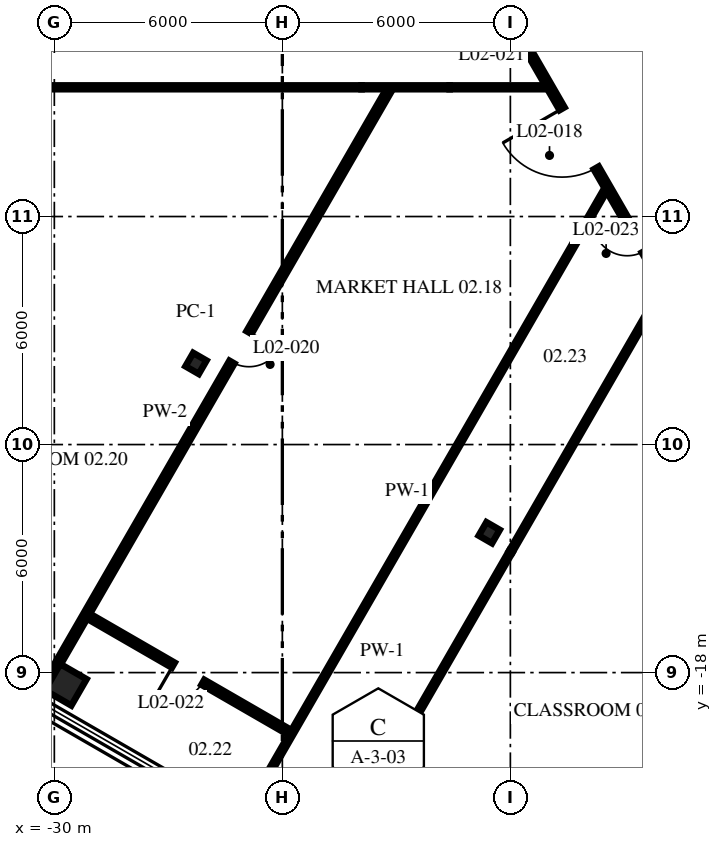
"""IFC4 building model, lengths in metres.
Left out: names, types, materials, properties, quantities, classifications, styles, units other than length and angle.
Written with IfcOpenShell. Run it as: python <this file> out.ifc"""

import sys

from ifc_helpers import new_model, si_unit, direction, frame, frame_2d, origin, origin_2d, place, context, subcontext, project, spatial, rectangle, i_section, extrude, source, transform, mapped, element, fill, save


model = new_model("IFC4")
c1 = context("Model", 3, precision=1e-05, world=origin(), true_north=direction((0.0, 1.0)))
c2 = subcontext(c1, "Body", "Model", "MODEL_VIEW")
j1 = project(units=[si_unit("LENGTHUNIT", "METRE"), si_unit("PLANEANGLEUNIT", "RADIAN")], contexts=[c1])
p1 = place(None, origin())
s1 = spatial("IfcSite", under=j1, at=p1, CompositionType="ELEMENT")
p2 = place(p1, origin())
s2 = spatial("IfcBuilding", under=s1, at=p2, CompositionType="ELEMENT")
p3 = place(p2, frame((0.0, 0.0, 11.5)))
s3 = spatial("IfcBuildingStorey", under=s2, at=p3, CompositionType="ELEMENT", Elevation=11.5)
m1 = source(origin(), c2, "Body", "SweptSolid", [
    extrude(i_section(OverallWidth=0.404, OverallDepth=0.406, WebThickness=0.027, FlangeThickness=0.044, at=origin_2d()), origin(), (0.0, 0.0, 1.0), 4.5),
])
for number, where, z_axis, x_axis in (
    (1, (-26.272, -9.865, 0.0), (0.0, 0.0, 1.0), (0.866, -0.5, 0.0)),
    (2, (-18.556, -14.32, 0.0), (0.0, 0.0, 1.0), (0.866, -0.5, 0.0)),
):
    element("IfcColumn", number, at=place(p3, frame(where, z_axis=z_axis, x_axis=x_axis)), inside=s3, PredefinedType="COLUMN", context=c2, shape_type="MappedRepresentation", body=[
        mapped(m1, transform((0.0, 0.0, 0.0), scale=1.0)),
    ])
m2 = source(origin(), c2, "Body", "SweptSolid", [
    extrude(rectangle(XDim=0.8, YDim=0.8, at=origin_2d()), origin(), (0.0, 0.0, 1.0), 4.5),
])
p4 = place(p3, frame((-29.699, -18.32, 0.0), z_axis=(0.0, 0.0, 1.0), x_axis=(0.866025403784, -0.5, 0.0)))
e3 = element("IfcColumn", 3, at=p4, inside=s3, PredefinedType="COLUMN", context=c2, shape_type="MappedRepresentation", body=[
    mapped(m2, transform((0.0, 0.0, 0.0), scale=1.0)),
])
p5 = place(p3, frame((-18.441, -0.043, 0.0), z_axis=(0.0, 0.0, 1.0), x_axis=(0.499994421829, -0.866028624319, 0.0)))
e4 = element("IfcWall", 4, at=p5, inside=s3, PredefinedType="PARTITIONING", context=c2, shape_type="SweptSolid", body=[
    extrude(rectangle(XDim=18.416, YDim=0.15, at=frame_2d((9.208, 0.0))), origin(), (0.0, 0.0, 1.0), 4.3),
])
p6 = place(p5, frame((3.602, 0.0, 0.0)))
e5 = element("IfcOpeningElement", 5, at=p6, cuts=e4, PredefinedType="OPENING", context=c2, shape_type="SweptSolid", body=[
    extrude(rectangle(XDim=1.8, YDim=2.4, at=frame_2d((0.9, 1.2))), frame((0.0, 0.085, 0.0), z_axis=(0.0, -1.0, 0.0), x_axis=(1.0, 0.0, 0.0)), (0.0, 0.0, 1.0), 0.17),
])
p7 = place(p5, frame((1.0, 0.0, 0.0)))
e6 = element("IfcOpeningElement", 6, at=p7, cuts=e4, PredefinedType="OPENING", context=c2, shape_type="SweptSolid", body=[
    extrude(rectangle(XDim=0.9, YDim=2.1, at=frame_2d((0.45, 1.05))), frame((0.0, 0.085, 0.0), z_axis=(0.0, -1.0, 0.0), x_axis=(1.0, 0.0, 0.0)), (0.0, 0.0, 1.0), 0.17),
])
p8 = place(p5, frame((7.031, 0.0, 0.0)))
e7 = element("IfcOpeningElement", 7, at=p8, cuts=e4, PredefinedType="OPENING", context=c2, shape_type="SweptSolid", body=[
    extrude(rectangle(XDim=0.9, YDim=2.1, at=frame_2d((0.45, 1.05))), frame((0.0, 0.085, 0.0), z_axis=(0.0, -1.0, 0.0), x_axis=(1.0, 0.0, 0.0)), (0.0, 0.0, 1.0), 0.17),
])
p9 = place(p5, frame((13.233, 0.0, 0.0)))
e8 = element("IfcOpeningElement", 8, at=p9, cuts=e4, PredefinedType="OPENING", context=c2, shape_type="SweptSolid", body=[
    extrude(rectangle(XDim=0.9, YDim=2.1, at=frame_2d((0.45, 1.05))), frame((0.0, 0.085, 0.0), z_axis=(0.0, -1.0, 0.0), x_axis=(1.0, 0.0, 0.0)), (0.0, 0.0, 1.0), 0.17),
])
p10 = place(p3, frame((-29.122, -16.504, 0.0), z_axis=(0.0, 0.0, 1.0), x_axis=(0.866022773512, -0.500004555738, 0.0)))
e9 = element("IfcWall", 9, at=p10, inside=s3, PredefinedType="PARTITIONING", context=c2, shape_type="SweptSolid", body=[
    extrude(rectangle(XDim=6.168, YDim=0.15, at=frame_2d((3.084, 0.0))), origin(), (0.0, 0.0, 1.0), 4.3),
])
p11 = place(p10, frame((2.6, 0.0, 0.0)))
e10 = element("IfcOpeningElement", 10, at=p11, cuts=e9, PredefinedType="OPENING", context=c2, shape_type="SweptSolid", body=[
    extrude(rectangle(XDim=0.9, YDim=2.1, at=frame_2d((0.45, 1.05))), frame((0.0, 0.085, 0.0), z_axis=(0.0, -1.0, 0.0), x_axis=(1.0, 0.0, 0.0)), (0.0, 0.0, 1.0), 0.17),
])
p12 = place(p3, frame((-39.237, -2.6, 0.0), z_axis=(0.0, 0.0, 1.0), x_axis=(1.0, 0.0, 0.0)))
e11 = element("IfcWall", 11, at=p12, inside=s3, PredefinedType="PARTITIONING", context=c2, shape_type="SweptSolid", body=[
    extrude(rectangle(XDim=17.322, YDim=0.1, at=frame_2d((8.661, 0.0))), origin(), (0.0, 0.0, 1.0), 4.3),
])
p13 = place(p3, frame((-21.915, -2.6, 0.0), z_axis=(0.0, 0.0, 1.0), x_axis=(1.0, 0.0, 0.0)))
e12 = element("IfcWall", 12, at=p13, inside=s3, PredefinedType="PARTITIONING", context=c2, shape_type="SweptSolid", body=[
    extrude(rectangle(XDim=2.317, YDim=0.1, at=frame_2d((1.159, 0.0))), origin(), (0.0, 0.0, 1.0), 3.358),
])
p14 = place(p3, frame((-19.598, -2.6, 0.0), z_axis=(0.0, 0.0, 1.0), x_axis=(1.0, 0.0, 0.0)))
e13 = element("IfcWall", 13, at=p14, inside=s3, PredefinedType="PARTITIONING", context=c2, shape_type="SweptSolid", body=[
    extrude(rectangle(XDim=2.633, YDim=0.1, at=frame_2d((1.316, 0.0))), origin(), (0.0, 0.0, 1.0), 4.3),
])
p15 = place(p3, frame((-15.162, -26.263, 0.0), z_axis=(0.0, 0.0, 1.0), x_axis=(0.499984984754, 0.866034072667, 0.0)))
e14 = element("IfcWall", 14, at=p15, inside=s3, PredefinedType="PARTITIONING", context=c2, shape_type="SweptSolid", body=[
    extrude(rectangle(XDim=8.452, YDim=0.1, at=frame_2d((4.226, 0.0))), origin(), (0.0, 0.0, 1.0), 3.528),
])
m3 = source(origin(), c2, "Body", "SweptSolid", [
    extrude(rectangle(XDim=8.493, YDim=0.1, at=frame_2d((4.247, 0.0))), origin(), (0.0, 0.0, 1.0), 3.528),
])
p16 = place(p3, frame((-22.238, -22.177, 0.0), z_axis=(0.0, 0.0, 1.0), x_axis=(0.500003631449, 0.866023307156, 0.0)))
e15 = element("IfcWall", 15, at=p16, inside=s3, PredefinedType="PARTITIONING", context=c2, shape_type="MappedRepresentation", body=[
    mapped(m3, transform((0.0, 0.0, 0.0), scale=1.0)),
])
m4 = source(origin(), c2, "Body", "SweptSolid", [
    extrude(rectangle(XDim=7.993, YDim=0.1, at=frame_2d((3.996, 0.0))), origin(), (0.0, 0.0, 1.0), 4.3),
])
p17 = place(p3, frame((-17.991, -14.822, 0.0), z_axis=(0.0, 0.0, 1.0), x_axis=(0.499999202028, 0.866025864493, 0.0)))
e16 = element("IfcWall", 16, at=p17, inside=s3, PredefinedType="PARTITIONING", context=c2, shape_type="MappedRepresentation", body=[
    mapped(m4, transform((0.0, 0.0, 0.0), scale=1.0)),
])
p18 = place(p3, frame((-25.017, -21.79, 0.0), z_axis=(0.0, 0.0, 1.0), x_axis=(0.499998622058, 0.866026199338, 0.0)))
e17 = element("IfcWall", 17, at=p18, inside=s3, PredefinedType="PARTITIONING", context=c2, shape_type="SweptSolid", body=[
    extrude(rectangle(XDim=19.131, YDim=0.1, at=frame_2d((9.565, 0.0))), origin(), (0.0, 0.0, 1.0), 4.3),
])
p19 = place(p3, frame((-30.428, -18.666, 0.0), z_axis=(0.0, 0.0, 1.0), x_axis=(0.499997035717, 0.866027115207, 0.0)))
e18 = element("IfcWall", 18, at=p19, inside=s3, PredefinedType="PARTITIONING", context=c2, shape_type="SweptSolid", body=[
    extrude(rectangle(XDim=18.472, YDim=0.15, at=frame_2d((9.236, 0.0))), origin(), (0.0, 0.0, 1.0), 4.3),
])
p20 = place(p19, frame((10.202, 0.0, 0.0)))
e19 = element("IfcOpeningElement", 19, at=p20, cuts=e18, PredefinedType="OPENING", context=c2, shape_type="SweptSolid", body=[
    extrude(rectangle(XDim=0.9, YDim=2.1, at=frame_2d((0.45, 1.05))), frame((0.0, 0.085, 0.0), z_axis=(0.0, -1.0, 0.0), x_axis=(1.0, 0.0, 0.0)), (0.0, 0.0, 1.0), 0.17),
])
p21 = place(p6, origin())
e20 = element("IfcDoor", 20, at=p21, inside=s3, OperationType="DOUBLE_DOOR_SINGLE_SWING", PredefinedType="DOOR", context=c2, shape_type="SweptSolid", body=[
    extrude(rectangle(XDim=1.8, YDim=2.4, at=frame_2d((0.9, 1.2))), frame((0.0, 0.025, 0.0), z_axis=(0.0, -1.0, 0.0), x_axis=(1.0, 0.0, 0.0)), (0.0, 0.0, 1.0), 0.05),
])
fill(e5, e20)
p22 = place(p20, origin())
e21 = element("IfcDoor", 21, at=p22, inside=s3, OperationType="SINGLE_SWING_RIGHT", PredefinedType="DOOR", context=c2, shape_type="SweptSolid", body=[
    extrude(rectangle(XDim=0.9, YDim=2.1, at=frame_2d((0.45, 1.05))), frame((0.0, 0.025, 0.0), z_axis=(0.0, -1.0, 0.0), x_axis=(1.0, 0.0, 0.0)), (0.0, 0.0, 1.0), 0.05),
])
fill(e19, e21)
p23 = place(p7, origin())
e22 = element("IfcDoor", 22, at=p23, inside=s3, OperationType="SINGLE_SWING_RIGHT", PredefinedType="DOOR", context=c2, shape_type="SweptSolid", body=[
    extrude(rectangle(XDim=0.9, YDim=2.1, at=frame_2d((0.45, 1.05))), frame((0.0, 0.025, 0.0), z_axis=(0.0, -1.0, 0.0), x_axis=(1.0, 0.0, 0.0)), (0.0, 0.0, 1.0), 0.05),
])
fill(e6, e22)
p24 = place(p11, origin())
e23 = element("IfcDoor", 23, at=p24, inside=s3, OperationType="SINGLE_SWING_RIGHT", PredefinedType="DOOR", context=c2, shape_type="SweptSolid", body=[
    extrude(rectangle(XDim=0.9, YDim=2.1, at=frame_2d((0.45, 1.05))), frame((0.0, 0.025, 0.0), z_axis=(0.0, -1.0, 0.0), x_axis=(1.0, 0.0, 0.0)), (0.0, 0.0, 1.0), 0.05),
])
fill(e10, e23)
p25 = place(p8, origin())
e24 = element("IfcDoor", 24, at=p25, inside=s3, OperationType="SINGLE_SWING_RIGHT", PredefinedType="DOOR", context=c2, shape_type="SweptSolid", body=[
    extrude(rectangle(XDim=0.9, YDim=2.1, at=frame_2d((0.45, 1.05))), frame((0.0, 0.025, 0.0), z_axis=(0.0, -1.0, 0.0), x_axis=(1.0, 0.0, 0.0)), (0.0, 0.0, 1.0), 0.05),
])
fill(e7, e24)
save(model, sys.argv[1])
